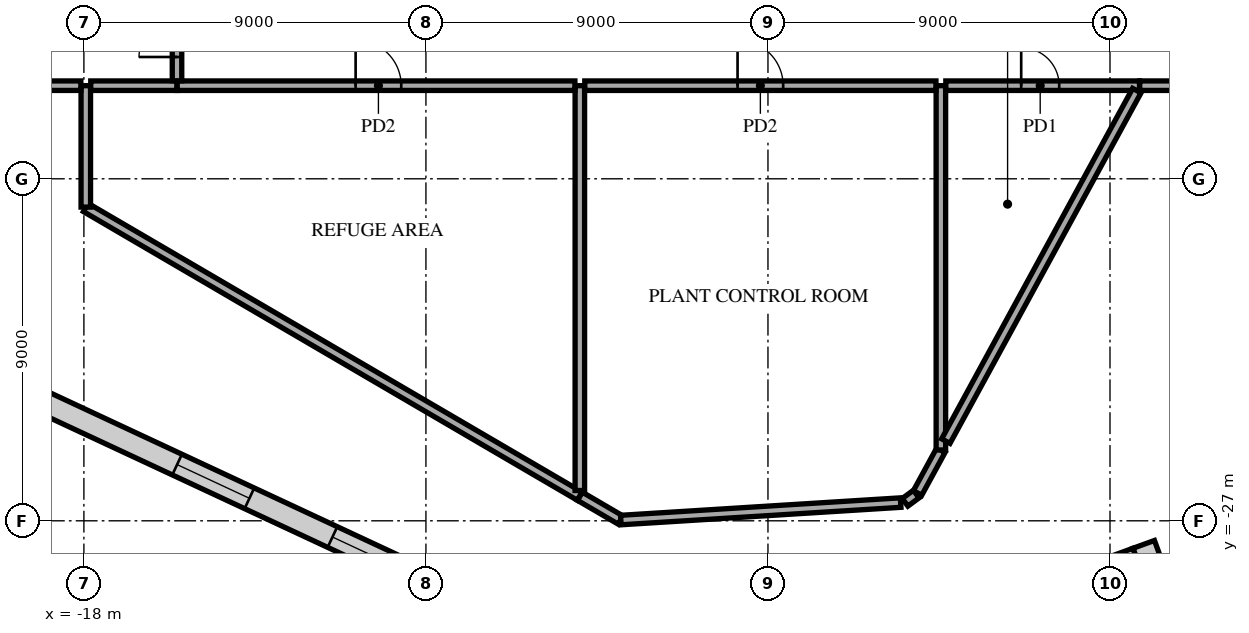
"""IFC4 building model, lengths in metres.
Left out: names, types, materials, properties, quantities, classifications, styles, units other than length and angle.
Written with IfcOpenShell. Run it as: python <this file> out.ifc"""

import sys

from ifc_helpers import new_model, si_unit, direction, frame, frame_2d, origin, place, context, subcontext, project, spatial, rectangle, extrude, element, fill, save


model = new_model("IFC4")
c1 = context("Model", 3, precision=1e-05, world=origin(), true_north=direction((0.0, 1.0)))
c2 = subcontext(c1, "Body", "Model", "MODEL_VIEW")
j1 = project(units=[si_unit("LENGTHUNIT", "METRE"), si_unit("PLANEANGLEUNIT", "RADIAN")], contexts=[c1])
p1 = place(None, origin())
s1 = spatial("IfcSite", under=j1, at=p1, CompositionType="ELEMENT")
p2 = place(p1, origin())
s2 = spatial("IfcBuilding", under=s1, at=p2, CompositionType="ELEMENT")
p3 = place(p2, frame((0.0, 0.0, 290.9)))
s3 = spatial("IfcBuildingStorey", under=s2, at=p3, CompositionType="ELEMENT", Elevation=290.9)
p4 = place(p3, frame((-4.95, -26.354, 0.0), z_axis=(0.0, 0.0, 1.0), x_axis=(0.86331523577, -0.504665041079, 0.0)))
e1 = element("IfcWall", 1, at=p4, inside=s3, PredefinedType="PARTITIONING", context=c2, shape_type="SweptSolid", body=[
    extrude(rectangle(XDim=1.242, YDim=0.25, at=frame_2d((0.621, 0.0))), origin(), (0.0, 0.0, 1.0), 4.416),
])
p5 = place(p3, frame((-3.872, -26.98, 0.0), z_axis=(0.0, 0.0, 1.0), x_axis=(0.998058754216, 0.062279395737, 0.0)))
e2 = element("IfcWall", 2, at=p5, inside=s3, PredefinedType="PARTITIONING", context=c2, shape_type="SweptSolid", body=[
    extrude(rectangle(XDim=7.378, YDim=0.25, at=frame_2d((3.689, 0.0))), origin(), (0.0, 0.0, 1.0), 4.416),
])
p6 = place(p3, frame((-17.95, -18.755, 0.0), z_axis=(0.0, 0.0, 1.0), x_axis=(0.863332668663, -0.504635217974, 0.0)))
e3 = element("IfcWall", 3, at=p6, inside=s3, PredefinedType="PARTITIONING", context=c2, shape_type="SweptSolid", body=[
    extrude(rectangle(XDim=15.053, YDim=0.25, at=frame_2d((7.526, 0.0))), origin(), (0.0, 0.0, 1.0), 4.416),
])
p7 = place(p3, frame((-4.95, -26.203, 0.0), z_axis=(0.0, 0.0, 1.0), x_axis=(0.0, 1.0, 0.0)))
e4 = element("IfcWall", 4, at=p7, inside=s3, PredefinedType="PARTITIONING", context=c2, shape_type="SweptSolid", body=[
    extrude(rectangle(XDim=10.653, YDim=0.25, at=frame_2d((5.326, 0.0))), origin(), (0.0, 0.0, 1.0), 5.25),
])
p8 = place(p3, frame((3.607, -26.513, 0.0), z_axis=(0.0, 0.0, 1.0), x_axis=(0.805660397695, 0.592377686604, 0.0)))
e5 = element("IfcWall", 5, at=p8, inside=s3, PredefinedType="PARTITIONING", context=c2, shape_type="SweptSolid", body=[
    extrude(rectangle(XDim=0.365, YDim=0.25, at=frame_2d((0.183, 0.0))), origin(), (0.0, 0.0, 1.0), 4.73),
])
p9 = place(p3, frame((3.936, -26.269, 0.0), z_axis=(0.0, 0.0, 1.0), x_axis=(0.478532025141, 0.878070100228, 0.0)))
e6 = element("IfcWall", 6, at=p9, inside=s3, PredefinedType="PARTITIONING", context=c2, shape_type="SweptSolid", body=[
    extrude(rectangle(XDim=1.283, YDim=0.25, at=frame_2d((0.641, 0.0))), origin(), (0.0, 0.0, 1.0), 4.73),
])
p10 = place(p3, frame((4.55, -25.137, 0.0), z_axis=(0.0, 0.0, 1.0), x_axis=(0.0, 1.0, 0.0)))
e7 = element("IfcWall", 7, at=p10, inside=s3, PredefinedType="PARTITIONING", context=c2, shape_type="SweptSolid", body=[
    extrude(rectangle(XDim=9.587, YDim=0.25, at=frame_2d((4.793, 0.0))), origin(), (0.0, 0.0, 1.0), 5.25),
])
p11 = place(p3, frame((-17.95, -18.745, 0.0), z_axis=(0.0, 0.0, 1.0), x_axis=(0.0, 1.0, 0.0)))
e8 = element("IfcWall", 8, at=p11, inside=s3, PredefinedType="PARTITIONING", context=c2, shape_type="SweptSolid", body=[
    extrude(rectangle(XDim=3.195, YDim=0.25, at=frame_2d((1.598, 0.0))), origin(), (0.0, 0.0, 1.0), 4.73),
])
p12 = place(p3, frame((-22.112, -15.55, 0.0), z_axis=(0.0, 0.0, 1.0), x_axis=(1.0, 0.0, 0.0)))
e9 = element("IfcWall", 9, at=p12, inside=s3, PredefinedType="PARTITIONING", context=c2, shape_type="SweptSolid", body=[
    extrude(rectangle(XDim=4.031, YDim=0.25, at=frame_2d((2.016, 0.0))), origin(), (0.0, 0.0, 1.0), 4.73),
])
p13 = place(p3, frame((-17.82, -15.55, 0.0), z_axis=(0.0, 0.0, 1.0), x_axis=(1.0, 0.0, 0.0)))
e10 = element("IfcWall", 10, at=p13, inside=s3, PredefinedType="PARTITIONING", context=c2, shape_type="SweptSolid", body=[
    extrude(rectangle(XDim=2.27, YDim=0.25, at=frame_2d((1.135, 0.0))), origin(), (0.0, 0.0, 1.0), 4.73),
])
p14 = place(p3, frame((-15.545, -15.55, 0.0), z_axis=(0.0, 0.0, 1.0), x_axis=(1.0, 0.0, 0.0)))
e11 = element("IfcWall", 11, at=p14, inside=s3, PredefinedType="PARTITIONING", context=c2, shape_type="SweptSolid", body=[
    extrude(rectangle(XDim=10.465, YDim=0.25, at=frame_2d((5.232, 0.0))), origin(), (0.0, 0.0, 1.0), 4.73),
])
p15 = place(p14, frame((4.695, 0.0, 0.0)))
e12 = element("IfcOpeningElement", 12, at=p15, cuts=e11, PredefinedType="OPENING", context=c2, shape_type="SweptSolid", body=[
    extrude(rectangle(XDim=1.2, YDim=2.1, at=frame_2d((0.6, 1.05))), frame((0.0, 0.135, 0.0), z_axis=(0.0, -1.0, 0.0), x_axis=(1.0, 0.0, 0.0)), (0.0, 0.0, 1.0), 0.27),
])
p16 = place(p3, frame((-4.82, -15.55, 0.0), z_axis=(0.0, 0.0, 1.0), x_axis=(1.0, 0.0, 0.0)))
e13 = element("IfcWall", 13, at=p16, inside=s3, PredefinedType="PARTITIONING", context=c2, shape_type="SweptSolid", body=[
    extrude(rectangle(XDim=9.24, YDim=0.25, at=frame_2d((4.62, 0.0))), origin(), (0.0, 0.0, 1.0), 4.73),
])
p17 = place(p16, frame((4.02, 0.0, 0.0)))
e14 = element("IfcOpeningElement", 14, at=p17, cuts=e13, PredefinedType="OPENING", context=c2, shape_type="SweptSolid", body=[
    extrude(rectangle(XDim=1.2, YDim=2.1, at=frame_2d((0.6, 1.05))), frame((0.0, 0.135, 0.0), z_axis=(0.0, -1.0, 0.0), x_axis=(1.0, 0.0, 0.0)), (0.0, 0.0, 1.0), 0.27),
])
p18 = place(p3, frame((4.68, -15.55, 0.0), z_axis=(0.0, 0.0, 1.0), x_axis=(1.0, 0.0, 0.0)))
e15 = element("IfcWall", 15, at=p18, inside=s3, PredefinedType="PARTITIONING", context=c2, shape_type="SweptSolid", body=[
    extrude(rectangle(XDim=5.097, YDim=0.25, at=frame_2d((2.548, 0.0))), origin(), (0.0, 0.0, 1.0), 4.73),
])
p19 = place(p18, frame((1.983, 0.0, 0.0)))
e16 = element("IfcOpeningElement", 16, at=p19, cuts=e15, PredefinedType="OPENING", context=c2, shape_type="SweptSolid", body=[
    extrude(rectangle(XDim=1.0, YDim=2.1, at=frame_2d((0.5, 1.05))), frame((0.0, 0.135, 0.0), z_axis=(0.0, -1.0, 0.0), x_axis=(1.0, 0.0, 0.0)), (0.0, 0.0, 1.0), 0.27),
])
p20 = place(p3, frame((4.68, -24.904, 0.0), z_axis=(0.0, 0.0, 1.0), x_axis=(0.478461261154, 0.878108661599, 0.0)))
e17 = element("IfcWall", 17, at=p20, inside=s3, PredefinedType="PARTITIONING", context=c2, shape_type="SweptSolid", body=[
    extrude(rectangle(XDim=10.504, YDim=0.25, at=frame_2d((5.252, 0.0))), origin(), (0.0, 0.0, 1.0), 4.73),
])
p21 = place(p3, frame((9.781, -15.55, 0.0), z_axis=(0.0, 0.0, 1.0), x_axis=(1.0, 0.0, 0.0)))
e18 = element("IfcWall", 18, at=p21, inside=s3, PredefinedType="PARTITIONING", context=c2, shape_type="SweptSolid", body=[
    extrude(rectangle(XDim=5.769, YDim=0.25, at=frame_2d((2.884, 0.0))), origin(), (0.0, 0.0, 1.0), 4.43),
])
p22 = place(p3, frame((-15.55, -15.42, 0.0), z_axis=(0.0, 0.0, 1.0), x_axis=(0.0, 1.0, 0.0)))
e19 = element("IfcWall", 19, at=p22, inside=s3, PredefinedType="PARTITIONING", context=c2, shape_type="SweptSolid", body=[
    extrude(rectangle(XDim=2.38, YDim=0.25, at=frame_2d((1.19, 0.0))), origin(), (0.0, 0.0, 1.0), 4.73),
])
p23 = place(p22, frame((0.625, 0.0, 0.0)))
e20 = element("IfcOpeningElement", 20, at=p23, cuts=e19, PredefinedType="OPENING", context=c2, shape_type="SweptSolid", body=[
    extrude(rectangle(XDim=1.0, YDim=2.1, at=frame_2d((0.5, 1.05))), frame((0.0, 0.135, 0.0), z_axis=(0.0, -1.0, 0.0), x_axis=(1.0, 0.0, 0.0)), (0.0, 0.0, 1.0), 0.27),
])
p24 = place(p3, frame((-28.904, -19.292, 0.0), z_axis=(0.0, 0.0, 1.0), x_axis=(0.906306682829, -0.422620629713, 0.0)))
e21 = element("IfcWall", 21, at=p24, inside=s3, PredefinedType="STANDARD", context=c2, shape_type="SweptSolid", body=[
    extrude(rectangle(XDim=36.086, YDim=0.6, at=frame_2d((18.043, 0.0))), origin(), (0.0, 0.0, 1.0), 5.25),
])
p25 = place(p24, frame((1.205, 0.0, 0.6)))
e22 = element("IfcOpeningElement", 22, at=p25, cuts=e21, PredefinedType="OPENING", context=c2, shape_type="SweptSolid", body=[
    extrude(rectangle(XDim=2.1, YDim=4.2, at=frame_2d((1.05, 2.1))), frame((0.0, 0.31, 0.0), z_axis=(0.0, -1.0, 0.0), x_axis=(1.0, 0.0, 0.0)), (0.0, 0.0, 1.0), 0.62),
])
p26 = place(p24, frame((14.738, 0.0, 0.6)))
e23 = element("IfcOpeningElement", 23, at=p26, cuts=e21, PredefinedType="OPENING", context=c2, shape_type="SweptSolid", body=[
    extrude(rectangle(XDim=2.1, YDim=4.2, at=frame_2d((1.05, 2.1))), frame((0.0, 0.31, 0.0), z_axis=(0.0, -1.0, 0.0), x_axis=(1.0, 0.0, 0.0)), (0.0, 0.0, 1.0), 0.62),
])
p27 = place(p24, frame((19.249, 0.0, 0.6)))
e24 = element("IfcOpeningElement", 24, at=p27, cuts=e21, PredefinedType="OPENING", context=c2, shape_type="SweptSolid", body=[
    extrude(rectangle(XDim=2.1, YDim=4.2, at=frame_2d((1.05, 2.1))), frame((0.0, 0.31, 0.0), z_axis=(0.0, -1.0, 0.0), x_axis=(1.0, 0.0, 0.0)), (0.0, 0.0, 1.0), 0.62),
])
p28 = place(p24, frame((23.759, 0.0, 0.6)))
e25 = element("IfcOpeningElement", 25, at=p28, cuts=e21, PredefinedType="OPENING", context=c2, shape_type="SweptSolid", body=[
    extrude(rectangle(XDim=2.1, YDim=4.2, at=frame_2d((1.05, 2.1))), frame((0.0, 0.31, 0.0), z_axis=(0.0, -1.0, 0.0), x_axis=(1.0, 0.0, 0.0)), (0.0, 0.0, 1.0), 0.62),
])
p29 = place(p24, frame((28.27, 0.0, 0.6)))
e26 = element("IfcOpeningElement", 26, at=p29, cuts=e21, PredefinedType="OPENING", context=c2, shape_type="SweptSolid", body=[
    extrude(rectangle(XDim=2.1, YDim=4.2, at=frame_2d((1.05, 2.1))), frame((0.0, 0.31, 0.0), z_axis=(0.0, -1.0, 0.0), x_axis=(1.0, 0.0, 0.0)), (0.0, 0.0, 1.0), 0.62),
])
p30 = place(p24, frame((32.781, 0.0, 0.6)))
e27 = element("IfcOpeningElement", 27, at=p30, cuts=e21, PredefinedType="OPENING", context=c2, shape_type="SweptSolid", body=[
    extrude(rectangle(XDim=2.1, YDim=4.2, at=frame_2d((1.05, 2.1))), frame((0.0, 0.31, 0.0), z_axis=(0.0, -1.0, 0.0), x_axis=(1.0, 0.0, 0.0)), (0.0, 0.0, 1.0), 0.62),
])
p31 = place(p3, frame((8.49, -28.448, 0.0), z_axis=(0.0, 0.0, 1.0), x_axis=(0.939672502629, 0.342075412451, 0.0)))
e28 = element("IfcWall", 28, at=p31, inside=s3, PredefinedType="STANDARD", context=c2, shape_type="SweptSolid", body=[
    extrude(rectangle(XDim=1.298, YDim=0.6, at=frame_2d((0.649, 0.0))), origin(), (0.0, 0.0, 1.0), 4.436),
])
p32 = place(p3, frame((9.888, -27.62, 0.0), z_axis=(0.0, 0.0, 1.0), x_axis=(0.341975639159, -0.939708817784, 0.0)))
e29 = element("IfcWall", 29, at=p32, inside=s3, PredefinedType="STANDARD", context=c2, shape_type="SweptSolid", body=[
    extrude(rectangle(XDim=4.635, YDim=0.6, at=frame_2d((2.318, 0.0))), origin(), (0.0, 0.0, 1.0), 5.25),
])
p33 = place(p32, frame((1.818, 0.0, 0.6)))
e30 = element("IfcOpeningElement", 30, at=p33, cuts=e29, PredefinedType="OPENING", context=c2, shape_type="SweptSolid", body=[
    extrude(rectangle(XDim=1.6, YDim=4.2, at=frame_2d((0.8, 2.1))), frame((0.0, 0.31, 0.0), z_axis=(0.0, -1.0, 0.0), x_axis=(1.0, 0.0, 0.0)), (0.0, 0.0, 1.0), 0.62),
])
p34 = place(p19, origin())
e31 = element("IfcDoor", 31, at=p34, inside=s3, OperationType="SINGLE_SWING_LEFT", PredefinedType="DOOR", context=c2, shape_type="SweptSolid", body=[
    extrude(rectangle(XDim=1.0, YDim=2.1, at=frame_2d((0.5, 1.05))), frame((0.0, 0.025, 0.0), z_axis=(0.0, -1.0, 0.0), x_axis=(1.0, 0.0, 0.0)), (0.0, 0.0, 1.0), 0.05),
])
fill(e16, e31)
p35 = place(p17, origin())
e32 = element("IfcDoor", 32, at=p35, inside=s3, OperationType="SINGLE_SWING_RIGHT", PredefinedType="DOOR", context=c2, shape_type="SweptSolid", body=[
    extrude(rectangle(XDim=1.2, YDim=2.1, at=frame_2d((0.6, 1.05))), frame((0.0, 0.025, 0.0), z_axis=(0.0, -1.0, 0.0), x_axis=(1.0, 0.0, 0.0)), (0.0, 0.0, 1.0), 0.05),
])
fill(e14, e32)
p36 = place(p15, origin())
e33 = element("IfcDoor", 33, at=p36, inside=s3, OperationType="SINGLE_SWING_LEFT", PredefinedType="DOOR", context=c2, shape_type="SweptSolid", body=[
    extrude(rectangle(XDim=1.2, YDim=2.1, at=frame_2d((0.6, 1.05))), frame((0.0, 0.025, 0.0), z_axis=(0.0, -1.0, 0.0), x_axis=(1.0, 0.0, 0.0)), (0.0, 0.0, 1.0), 0.05),
])
fill(e12, e33)
p37 = place(p23, origin())
e34 = element("IfcDoor", 34, at=p37, inside=s3, OperationType="SINGLE_SWING_LEFT", PredefinedType="DOOR", context=c2, shape_type="SweptSolid", body=[
    extrude(rectangle(XDim=1.0, YDim=2.1, at=frame_2d((0.5, 1.05))), frame((0.0, 0.025, 0.0), z_axis=(0.0, -1.0, 0.0), x_axis=(1.0, 0.0, 0.0)), (0.0, 0.0, 1.0), 0.05),
])
fill(e20, e34)
p38 = place(p26, origin())
e35 = element("IfcWindow", 35, at=p38, inside=s3, PartitioningType="SINGLE_PANEL", PredefinedType="USERDEFINED", context=c2, shape_type="SweptSolid", body=[
    extrude(rectangle(XDim=2.1, YDim=4.2, at=frame_2d((1.05, 2.1))), frame((0.0, 0.03, 0.0), z_axis=(0.0, -1.0, 0.0), x_axis=(1.0, 0.0, 0.0)), (0.0, 0.0, 1.0), 0.06),
])
fill(e23, e35)
p39 = place(p27, origin())
e36 = element("IfcWindow", 36, at=p39, inside=s3, PartitioningType="SINGLE_PANEL", PredefinedType="USERDEFINED", context=c2, shape_type="SweptSolid", body=[
    extrude(rectangle(XDim=2.1, YDim=4.2, at=frame_2d((1.05, 2.1))), frame((0.0, 0.03, 0.0), z_axis=(0.0, -1.0, 0.0), x_axis=(1.0, 0.0, 0.0)), (0.0, 0.0, 1.0), 0.06),
])
fill(e24, e36)
save(model, sys.argv[1])
